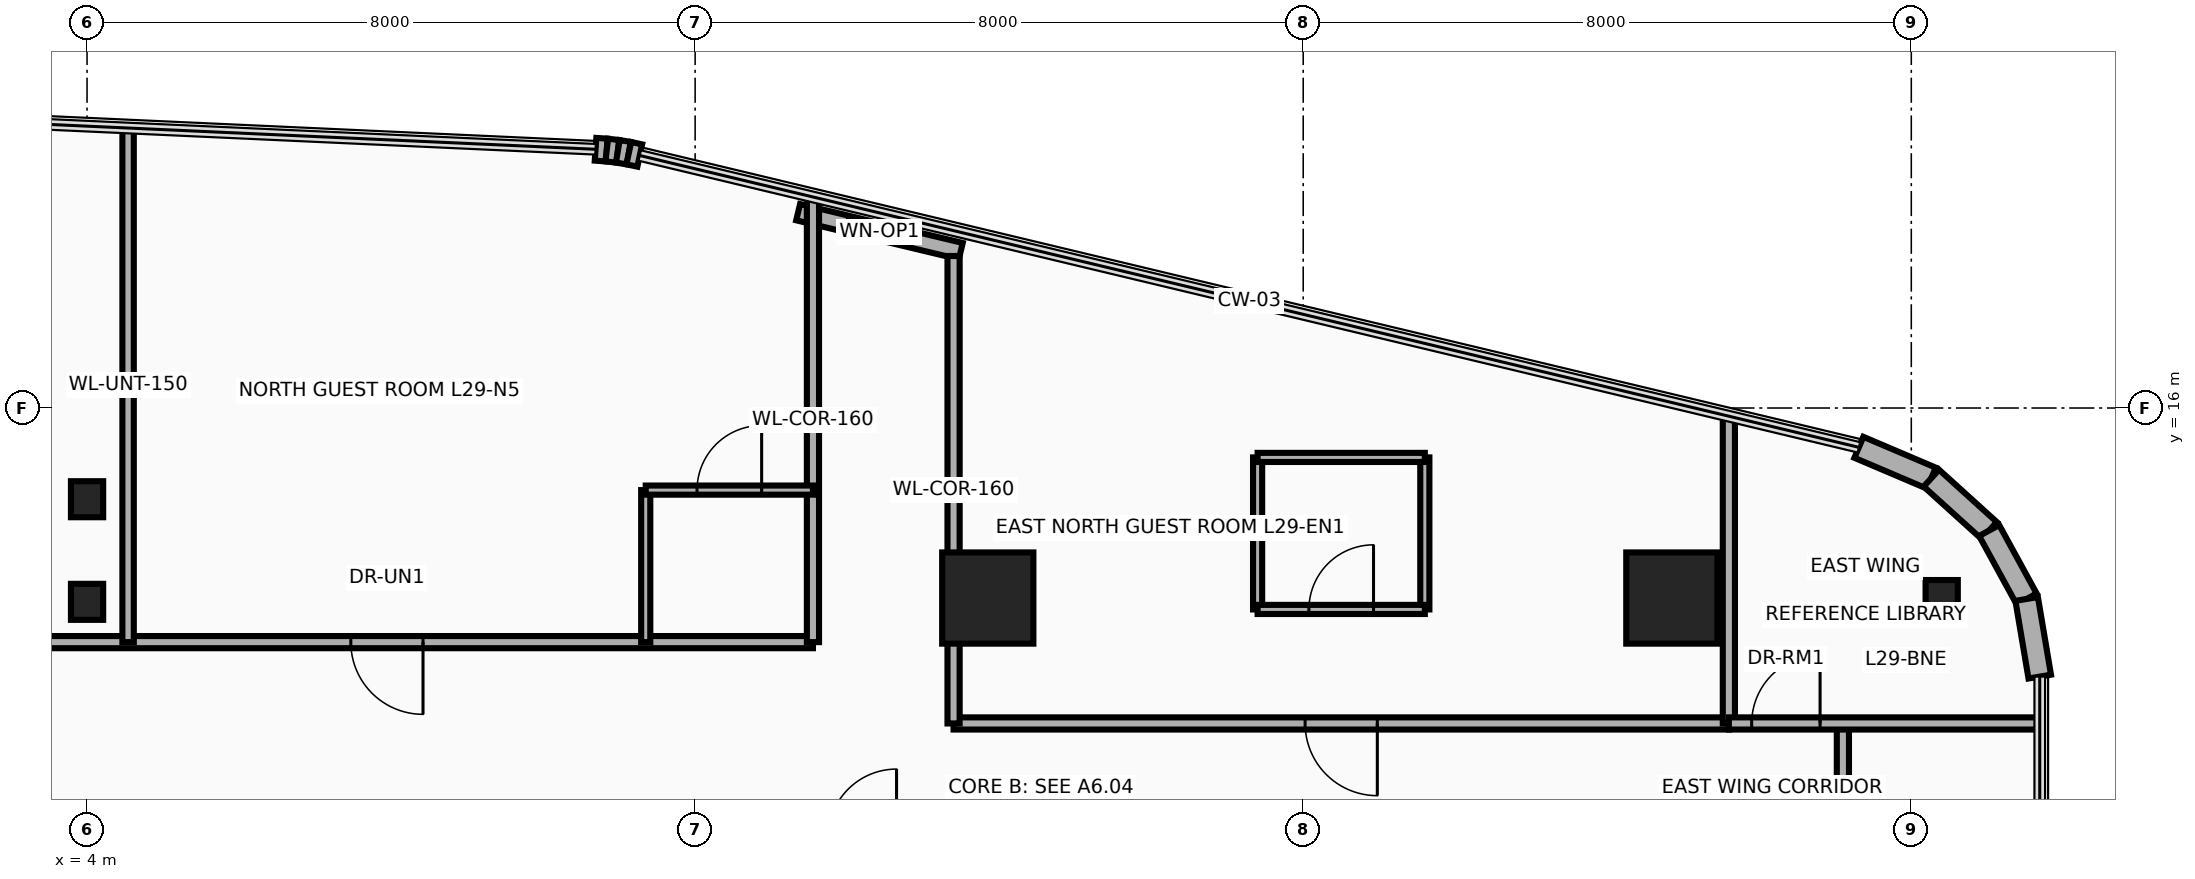
"""IFC4 building model, lengths in metres.
Left out: names, types, materials, properties, quantities, classifications, styles, units other than length and angle.
Written with IfcOpenShell. Run it as: python <this file> out.ifc"""

import sys

from ifc_helpers import new_model, si_unit, direction, frame, frame_2d, origin, origin_2d, place, context, subcontext, project, spatial, rectangle, i_section, extrude, source, transform, mapped, element, fill, save


model = new_model("IFC4")
c1 = context("Model", 3, precision=1e-05, world=origin(), true_north=direction((0.0, 1.0)))
c2 = subcontext(c1, "Body", "Model", "MODEL_VIEW")
j1 = project(units=[si_unit("LENGTHUNIT", "METRE"), si_unit("PLANEANGLEUNIT", "RADIAN")], contexts=[c1])
p1 = place(None, origin())
s1 = spatial("IfcSite", under=j1, at=p1, CompositionType="ELEMENT")
p2 = place(p1, origin())
s2 = spatial("IfcBuilding", under=s1, at=p2, CompositionType="ELEMENT")
p3 = place(p2, frame((0.0, 0.0, 116.8)))
s3 = spatial("IfcBuildingStorey", under=s2, at=p3, CompositionType="ELEMENT", Elevation=116.8)
m1 = source(origin(), c2, "Body", "SweptSolid", [
    extrude(rectangle(XDim=1.2, YDim=1.2, at=origin_2d()), origin(), (0.0, 0.0, 1.0), 3.7),
])
for number, where, z_axis, x_axis in (
    (1, (15.85, 13.5, 0.0), (0.0, 0.0, 1.0), (1.0, 0.0, 0.0)),
    (2, (24.85, 13.5, 0.0), (0.0, 0.0, 1.0), (1.0, 0.0, 0.0)),
):
    element("IfcColumn", number, at=place(p3, frame(where, z_axis=z_axis, x_axis=x_axis)), inside=s3, PredefinedType="COLUMN", context=c2, shape_type="MappedRepresentation", body=[
        mapped(m1, transform((0.0, 0.0, 0.0), x_axis=(1.0, 0.0, 0.0), y_axis=(0.0, 1.0, 0.0), z_axis=(0.0, 0.0, 1.0), scale=1.0)),
    ])
m2 = source(origin(), c2, "Body", "SweptSolid", [
    extrude(i_section(OverallWidth=0.424, OverallDepth=0.474, WebThickness=0.048, FlangeThickness=0.077, at=origin_2d()), origin(), (0.0, 0.0, 1.0), 3.7),
])
for number, where, z_axis, x_axis in (
    (3, (28.4, 13.5, 0.0), (0.0, 0.0, 1.0), (1.0, 0.0, 0.0)),
    (4, (4.0, 13.45, 0.0), (0.0, 0.0, 1.0), (1.0, 0.0, 0.0)),
    (5, (4.0, 14.8, 0.0), (0.0, 0.0, 1.0), (1.0, 0.0, 0.0)),
):
    element("IfcColumn", number, at=place(p3, frame(where, z_axis=z_axis, x_axis=x_axis)), inside=s3, PredefinedType="COLUMN", context=c2, shape_type="MappedRepresentation", body=[
        mapped(m2, transform((0.0, 0.0, 0.0), x_axis=(1.0, 0.0, 0.0), y_axis=(0.0, 1.0, 0.0), z_axis=(0.0, 0.0, 1.0), scale=1.0)),
    ])
p4 = place(p3, frame((10.69, 19.404, 0.0), z_axis=(0.0, 0.0, 1.0), x_axis=(0.99758310784, -0.069483400546, 0.0)))
e6 = element("IfcWall", 6, at=p4, inside=s3, PredefinedType="SOLIDWALL", context=c2, shape_type="SweptSolid", body=[
    extrude(rectangle(XDim=0.147, YDim=0.3, at=frame_2d((0.074, 0.0))), origin(), (0.0, 0.0, 1.0), 3.46),
])
for number, where, z_axis, x_axis in (
    (7, (10.837, 19.394, 0.0), (0.0, 0.0, 1.0), (0.993, -0.117, 0.0)),
    (8, (10.983, 19.377, 0.0), (0.0, 0.0, 1.0), (0.987, -0.163, 0.0)),
):
    element("IfcWall", number, at=place(p3, frame(where, z_axis=z_axis, x_axis=x_axis)), inside=s3, PredefinedType="SOLIDWALL", context=c2, shape_type="SweptSolid", body=[
        extrude(rectangle(XDim=0.146, YDim=0.3, at=frame_2d((0.073, 0.0))), origin(), (0.0, 0.0, 1.0), 3.46),
    ])
p5 = place(p3, frame((11.127, 19.353, 0.0), z_axis=(0.0, 0.0, 1.0), x_axis=(0.978019841688, -0.208511844421, 0.0)))
e9 = element("IfcWall", 9, at=p5, inside=s3, PredefinedType="SOLIDWALL", context=c2, shape_type="SweptSolid", body=[
    extrude(rectangle(XDim=0.147, YDim=0.3, at=frame_2d((0.074, 0.0))), origin(), (0.0, 0.0, 1.0), 3.46),
])
p6 = place(p3, frame((13.355, 18.576, 0.0), z_axis=(0.0, 0.0, 1.0), x_axis=(0.97252211384, -0.232810519721, 0.0)))
e10 = element("IfcWall", 10, at=p6, inside=s3, PredefinedType="SOLIDWALL", context=c2, shape_type="SweptSolid", body=[
    extrude(rectangle(XDim=2.2, YDim=0.22, at=frame_2d((1.1, 0.0))), origin(), (0.0, 0.0, 1.0), 3.46),
])
p7 = place(p6, frame((0.65, 0.0, 0.95)))
e11 = element("IfcOpeningElement", 11, at=p7, cuts=e10, PredefinedType="OPENING", context=c2, shape_type="SweptSolid", body=[
    extrude(rectangle(XDim=0.9, YDim=1.3, at=frame_2d((0.45, 0.65))), frame((0.0, 0.125, 0.0), z_axis=(0.0, -1.0, 0.0), x_axis=(1.0, 0.0, 0.0)), (0.0, 0.0, 1.0), 0.25),
])
p8 = place(p3, frame((27.31, 15.483, 0.0), z_axis=(0.0, 0.0, 1.0), x_axis=(0.920250328759, -0.391330208927, 0.0)))
e12 = element("IfcWall", 12, at=p8, inside=s3, PredefinedType="SOLIDWALL", context=c2, shape_type="SweptSolid", body=[
    extrude(rectangle(XDim=1.036, YDim=0.3, at=frame_2d((0.518, 0.0))), origin(), (0.0, 0.0, 1.0), 3.46),
])
p9 = place(p3, frame((28.264, 15.077, 0.0), z_axis=(0.0, 0.0, 1.0), x_axis=(0.741208839713, -0.671274501178, 0.0)))
e13 = element("IfcWall", 13, at=p9, inside=s3, PredefinedType="SOLIDWALL", context=c2, shape_type="SweptSolid", body=[
    extrude(rectangle(XDim=1.026, YDim=0.3, at=frame_2d((0.513, 0.0))), origin(), (0.0, 0.0, 1.0), 3.46),
])
p10 = place(p3, frame((29.025, 14.388, 0.0), z_axis=(0.0, 0.0, 1.0), x_axis=(0.480284137298, -0.87711296163, 0.0)))
e14 = element("IfcWall", 14, at=p10, inside=s3, PredefinedType="SOLIDWALL", context=c2, shape_type="SweptSolid", body=[
    extrude(rectangle(XDim=1.027, YDim=0.3, at=frame_2d((0.513, 0.0))), origin(), (0.0, 0.0, 1.0), 3.46),
])
p11 = place(p3, frame((29.518, 13.488, 0.0), z_axis=(0.0, 0.0, 1.0), x_axis=(0.166156796952, -0.986099345313, 0.0)))
e15 = element("IfcWall", 15, at=p11, inside=s3, PredefinedType="SOLIDWALL", context=c2, shape_type="SweptSolid", body=[
    extrude(rectangle(XDim=1.036, YDim=0.3, at=frame_2d((0.518, 0.0))), origin(), (0.0, 0.0, 1.0), 3.46),
])
p12 = place(p3, frame((-28.25, 12.92, 0.0), z_axis=(0.0, 0.0, 1.0), x_axis=(1.0, 0.0, 0.0)))
e16 = element("IfcWall", 16, at=p12, inside=s3, PredefinedType="PARTITIONING", context=c2, shape_type="SweptSolid", body=[
    extrude(rectangle(XDim=41.8, YDim=0.16, at=frame_2d((20.9, 0.0))), origin(), (0.0, 0.0, 1.0), 2.666),
])
p13 = place(p12, frame((2.75, 0.0, 0.0)))
e17 = element("IfcOpeningElement", 17, at=p13, cuts=e16, PredefinedType="OPENING", context=c2, shape_type="SweptSolid", body=[
    extrude(rectangle(XDim=0.95, YDim=2.15, at=frame_2d((0.475, 1.075))), frame((0.0, 0.095, 0.0), z_axis=(0.0, -1.0, 0.0), x_axis=(1.0, 0.0, 0.0)), (0.0, 0.0, 1.0), 0.19),
])
p14 = place(p12, frame((10.135, 0.0, 0.0)))
e18 = element("IfcOpeningElement", 18, at=p14, cuts=e16, PredefinedType="OPENING", context=c2, shape_type="SweptSolid", body=[
    extrude(rectangle(XDim=0.95, YDim=2.15, at=frame_2d((0.475, 1.075))), frame((0.0, 0.095, 0.0), z_axis=(0.0, -1.0, 0.0), x_axis=(1.0, 0.0, 0.0)), (0.0, 0.0, 1.0), 0.19),
])
p15 = place(p12, frame((18.8, 0.0, 0.0)))
e19 = element("IfcOpeningElement", 19, at=p15, cuts=e16, PredefinedType="OPENING", context=c2, shape_type="SweptSolid", body=[
    extrude(rectangle(XDim=0.95, YDim=2.15, at=frame_2d((0.475, 1.075))), frame((0.0, 0.095, 0.0), z_axis=(0.0, -1.0, 0.0), x_axis=(1.0, 0.0, 0.0)), (0.0, 0.0, 1.0), 0.19),
])
p16 = place(p12, frame((27.81, 0.0, 0.0)))
e20 = element("IfcOpeningElement", 20, at=p16, cuts=e16, PredefinedType="OPENING", context=c2, shape_type="SweptSolid", body=[
    extrude(rectangle(XDim=0.95, YDim=2.15, at=frame_2d((0.475, 1.075))), frame((0.0, 0.095, 0.0), z_axis=(0.0, -1.0, 0.0), x_axis=(1.0, 0.0, 0.0)), (0.0, 0.0, 1.0), 0.19),
])
p17 = place(p12, frame((35.72, 0.0, 0.0)))
e21 = element("IfcOpeningElement", 21, at=p17, cuts=e16, PredefinedType="OPENING", context=c2, shape_type="SweptSolid", body=[
    extrude(rectangle(XDim=0.95, YDim=2.15, at=frame_2d((0.475, 1.075))), frame((0.0, 0.095, 0.0), z_axis=(0.0, -1.0, 0.0), x_axis=(1.0, 0.0, 0.0)), (0.0, 0.0, 1.0), 0.19),
])
p18 = place(p3, frame((13.55, 12.92, 0.0), z_axis=(0.0, 0.0, 1.0), x_axis=(0.0, 1.0, 0.0)))
e22 = element("IfcWall", 22, at=p18, inside=s3, PredefinedType="PARTITIONING", context=c2, shape_type="SweptSolid", body=[
    extrude(rectangle(XDim=5.857, YDim=0.16, at=frame_2d((2.928, 0.0))), origin(), (0.0, 0.0, 1.0), 2.666),
])
p19 = place(p3, frame((4.54, 12.92, 0.0), z_axis=(0.0, 0.0, 1.0), x_axis=(0.0, 1.0, 0.0)))
e23 = element("IfcWall", 23, at=p19, inside=s3, PredefinedType="PARTITIONING", context=c2, shape_type="SweptSolid", body=[
    extrude(rectangle(XDim=6.764, YDim=0.15, at=frame_2d((3.382, 0.0))), origin(), (0.0, 0.0, 1.0), 2.666),
])
p20 = place(p3, frame((11.35, 12.92, 0.0), z_axis=(0.0, 0.0, 1.0), x_axis=(0.0, 1.0, 0.0)))
e24 = element("IfcWall", 24, at=p20, inside=s3, PredefinedType="PARTITIONING", context=c2, shape_type="SweptSolid", body=[
    extrude(rectangle(XDim=2.0, YDim=0.12, at=frame_2d((1.0, 0.0))), origin(), (0.0, 0.0, 1.0), 2.666),
])
p21 = place(p3, frame((11.35, 14.92, 0.0), z_axis=(0.0, 0.0, 1.0), x_axis=(1.0, 0.0, 0.0)))
e25 = element("IfcWall", 25, at=p21, inside=s3, PredefinedType="PARTITIONING", context=c2, shape_type="SweptSolid", body=[
    extrude(rectangle(XDim=2.2, YDim=0.12, at=frame_2d((1.1, 0.0))), origin(), (0.0, 0.0, 1.0), 3.46),
])
p22 = place(p21, frame((0.675, 0.0, 0.0)))
e26 = element("IfcOpeningElement", 26, at=p22, cuts=e25, PredefinedType="OPENING", context=c2, shape_type="SweptSolid", body=[
    extrude(rectangle(XDim=0.85, YDim=2.1, at=frame_2d((0.425, 1.05))), frame((0.0, 0.075, 0.0), z_axis=(0.0, -1.0, 0.0), x_axis=(1.0, 0.0, 0.0)), (0.0, 0.0, 1.0), 0.15),
])
p23 = place(p3, frame((15.4, 11.85, 0.0), z_axis=(0.0, 0.0, 1.0), x_axis=(1.0, 0.0, 0.0)))
e27 = element("IfcWall", 27, at=p23, inside=s3, PredefinedType="PARTITIONING", context=c2, shape_type="SweptSolid", body=[
    extrude(rectangle(XDim=10.2, YDim=0.16, at=frame_2d((5.1, 0.0))), origin(), (0.0, 0.0, 1.0), 2.834),
])
p24 = place(p23, frame((4.625, 0.0, 0.0)))
e28 = element("IfcOpeningElement", 28, at=p24, cuts=e27, PredefinedType="OPENING", context=c2, shape_type="SweptSolid", body=[
    extrude(rectangle(XDim=0.95, YDim=2.15, at=frame_2d((0.475, 1.075))), frame((0.0, 0.095, 0.0), z_axis=(0.0, -1.0, 0.0), x_axis=(1.0, 0.0, 0.0)), (0.0, 0.0, 1.0), 0.19),
])
p25 = place(p3, frame((15.4, 11.85, 0.0), z_axis=(0.0, 0.0, 1.0), x_axis=(0.0, 1.0, 0.0)))
e29 = element("IfcWall", 29, at=p25, inside=s3, PredefinedType="PARTITIONING", context=c2, shape_type="SweptSolid", body=[
    extrude(rectangle(XDim=6.15, YDim=0.16, at=frame_2d((3.075, 0.0))), origin(), (0.0, 0.0, 1.0), 2.666),
])
p26 = place(p3, frame((25.6, 11.85, 0.0), z_axis=(0.0, 0.0, 1.0), x_axis=(0.0, 1.0, 0.0)))
e30 = element("IfcWall", 30, at=p26, inside=s3, PredefinedType="PARTITIONING", context=c2, shape_type="SweptSolid", body=[
    extrude(rectangle(XDim=4.042, YDim=0.16, at=frame_2d((2.021, 0.0))), origin(), (0.0, 0.0, 1.0), 2.666),
])
for number, where, z_axis, x_axis in (
    (31, (19.4, 13.35, 0.0), (0.0, 0.0, 1.0), (0.0, 1.0, 0.0)),
    (32, (21.6, 13.35, 0.0), (0.0, 0.0, 1.0), (0.0, 1.0, 0.0)),
):
    element("IfcWall", number, at=place(p3, frame(where, z_axis=z_axis, x_axis=x_axis)), inside=s3, PredefinedType="PARTITIONING", context=c2, shape_type="SweptSolid", body=[
        extrude(rectangle(XDim=2.0, YDim=0.12, at=frame_2d((1.0, 0.0))), origin(), (0.0, 0.0, 1.0), 2.666),
    ])
p27 = place(p3, frame((19.4, 15.35, 0.0), z_axis=(0.0, 0.0, 1.0), x_axis=(1.0, 0.0, 0.0)))
e33 = element("IfcWall", 33, at=p27, inside=s3, PredefinedType="PARTITIONING", context=c2, shape_type="SweptSolid", body=[
    extrude(rectangle(XDim=2.2, YDim=0.12, at=frame_2d((1.1, 0.0))), origin(), (0.0, 0.0, 1.0), 3.46),
])
p28 = place(p3, frame((19.4, 13.35, 0.0), z_axis=(0.0, 0.0, 1.0), x_axis=(1.0, 0.0, 0.0)))
e34 = element("IfcWall", 34, at=p28, inside=s3, PredefinedType="PARTITIONING", context=c2, shape_type="SweptSolid", body=[
    extrude(rectangle(XDim=2.2, YDim=0.12, at=frame_2d((1.1, 0.0))), origin(), (0.0, 0.0, 1.0), 2.666),
])
p29 = place(p28, frame((0.675, 0.0, 0.0)))
e35 = element("IfcOpeningElement", 35, at=p29, cuts=e34, PredefinedType="OPENING", context=c2, shape_type="SweptSolid", body=[
    extrude(rectangle(XDim=0.85, YDim=2.1, at=frame_2d((0.425, 1.05))), frame((0.0, 0.075, 0.0), z_axis=(0.0, -1.0, 0.0), x_axis=(1.0, 0.0, 0.0)), (0.0, 0.0, 1.0), 0.15),
])
p30 = place(p3, frame((27.1, -11.661, 0.0), z_axis=(0.0, 0.0, 1.0), x_axis=(0.0, 1.0, 0.0)))
e36 = element("IfcWall", 36, at=p30, inside=s3, PredefinedType="PARTITIONING", context=c2, shape_type="SweptSolid", body=[
    extrude(rectangle(XDim=23.511, YDim=0.16, at=frame_2d((11.755, 0.0))), origin(), (0.0, 0.0, 1.0), 2.666),
])
p31 = place(p30, frame((0.8, 0.0, 0.0)))
e37 = element("IfcOpeningElement", 37, at=p31, cuts=e36, PredefinedType="OPENING", context=c2, shape_type="SweptSolid", body=[
    extrude(rectangle(XDim=0.9, YDim=2.1, at=frame_2d((0.45, 1.05))), frame((0.0, 0.095, 0.0), z_axis=(0.0, -1.0, 0.0), x_axis=(1.0, 0.0, 0.0)), (0.0, 0.0, 1.0), 0.19),
])
p32 = place(p30, frame((6.28, 0.0, 0.0)))
e38 = element("IfcOpeningElement", 38, at=p32, cuts=e36, PredefinedType="OPENING", context=c2, shape_type="SweptSolid", body=[
    extrude(rectangle(XDim=0.9, YDim=2.1, at=frame_2d((0.45, 1.05))), frame((0.0, 0.095, 0.0), z_axis=(0.0, -1.0, 0.0), x_axis=(1.0, 0.0, 0.0)), (0.0, 0.0, 1.0), 0.19),
])
p33 = place(p30, frame((12.992, 0.0, 0.0)))
e39 = element("IfcOpeningElement", 39, at=p33, cuts=e36, PredefinedType="OPENING", context=c2, shape_type="SweptSolid", body=[
    extrude(rectangle(XDim=0.9, YDim=2.1, at=frame_2d((0.45, 1.05))), frame((0.0, 0.095, 0.0), z_axis=(0.0, -1.0, 0.0), x_axis=(1.0, 0.0, 0.0)), (0.0, 0.0, 1.0), 0.19),
])
p34 = place(p30, frame((19.705, 0.0, 0.0)))
e40 = element("IfcOpeningElement", 40, at=p34, cuts=e36, PredefinedType="OPENING", context=c2, shape_type="SweptSolid", body=[
    extrude(rectangle(XDim=0.9, YDim=2.1, at=frame_2d((0.45, 1.05))), frame((0.0, 0.095, 0.0), z_axis=(0.0, -1.0, 0.0), x_axis=(1.0, 0.0, 0.0)), (0.0, 0.0, 1.0), 0.19),
])
p35 = place(p3, frame((25.6, 11.85, 0.0), z_axis=(0.0, 0.0, 1.0), x_axis=(1.0, 0.0, 0.0)))
e41 = element("IfcWall", 41, at=p35, inside=s3, PredefinedType="PARTITIONING", context=c2, shape_type="SweptSolid", body=[
    extrude(rectangle(XDim=4.09, YDim=0.16, at=frame_2d((2.045, 0.0))), origin(), (0.0, 0.0, 1.0), 2.896),
])
p36 = place(p35, frame((0.3, 0.0, 0.0)))
e42 = element("IfcOpeningElement", 42, at=p36, cuts=e41, PredefinedType="OPENING", context=c2, shape_type="SweptSolid", body=[
    extrude(rectangle(XDim=0.9, YDim=2.1, at=frame_2d((0.45, 1.05))), frame((0.0, 0.095, 0.0), z_axis=(0.0, -1.0, 0.0), x_axis=(1.0, 0.0, 0.0)), (0.0, 0.0, 1.0), 0.19),
])
p37 = place(p7, origin())
e43 = element("IfcWindow", 43, at=p37, inside=s3, PartitioningType="SINGLE_PANEL", PredefinedType="WINDOW", context=c2, shape_type="SweptSolid", body=[
    extrude(rectangle(XDim=0.9, YDim=1.3, at=frame_2d((0.45, 0.65))), frame((0.0, 0.03, 0.0), z_axis=(0.0, -1.0, 0.0), x_axis=(1.0, 0.0, 0.0)), (0.0, 0.0, 1.0), 0.06),
])
fill(e11, e43)
p38 = place(p17, frame((0.95, 0.0, 0.0), z_axis=(0.0, 0.0, 1.0), x_axis=(-1.0, 0.0, 0.0)))
e44 = element("IfcDoor", 44, at=p38, inside=s3, OperationType="SINGLE_SWING_LEFT", PredefinedType="DOOR", context=c2, shape_type="SweptSolid", body=[
    extrude(rectangle(XDim=0.95, YDim=2.15, at=frame_2d((0.475, 1.075))), frame((0.0, 0.025, 0.0), z_axis=(0.0, -1.0, 0.0), x_axis=(1.0, 0.0, 0.0)), (0.0, 0.0, 1.0), 0.05),
])
fill(e21, e44)
p39 = place(p22, origin())
e45 = element("IfcDoor", 45, at=p39, inside=s3, OperationType="SINGLE_SWING_RIGHT", PredefinedType="DOOR", context=c2, shape_type="SweptSolid", body=[
    extrude(rectangle(XDim=0.85, YDim=2.1, at=frame_2d((0.425, 1.05))), frame((0.0, 0.025, 0.0), z_axis=(0.0, -1.0, 0.0), x_axis=(1.0, 0.0, 0.0)), (0.0, 0.0, 1.0), 0.05),
])
fill(e26, e45)
p40 = place(p24, frame((0.95, 0.0, 0.0), z_axis=(0.0, 0.0, 1.0), x_axis=(-1.0, 0.0, 0.0)))
e46 = element("IfcDoor", 46, at=p40, inside=s3, OperationType="SINGLE_SWING_LEFT", PredefinedType="DOOR", context=c2, shape_type="SweptSolid", body=[
    extrude(rectangle(XDim=0.95, YDim=2.15, at=frame_2d((0.475, 1.075))), frame((0.0, 0.025, 0.0), z_axis=(0.0, -1.0, 0.0), x_axis=(1.0, 0.0, 0.0)), (0.0, 0.0, 1.0), 0.05),
])
fill(e28, e46)
p41 = place(p29, origin())
e47 = element("IfcDoor", 47, at=p41, inside=s3, OperationType="SINGLE_SWING_RIGHT", PredefinedType="DOOR", context=c2, shape_type="SweptSolid", body=[
    extrude(rectangle(XDim=0.85, YDim=2.1, at=frame_2d((0.425, 1.05))), frame((0.0, 0.025, 0.0), z_axis=(0.0, -1.0, 0.0), x_axis=(1.0, 0.0, 0.0)), (0.0, 0.0, 1.0), 0.05),
])
fill(e35, e47)
p42 = place(p36, origin())
e48 = element("IfcDoor", 48, at=p42, inside=s3, OperationType="SINGLE_SWING_RIGHT", PredefinedType="DOOR", context=c2, shape_type="SweptSolid", body=[
    extrude(rectangle(XDim=0.9, YDim=2.1, at=frame_2d((0.45, 1.05))), frame((0.0, 0.025, 0.0), z_axis=(0.0, -1.0, 0.0), x_axis=(1.0, 0.0, 0.0)), (0.0, 0.0, 1.0), 0.05),
])
fill(e42, e48)
save(model, sys.argv[1])
